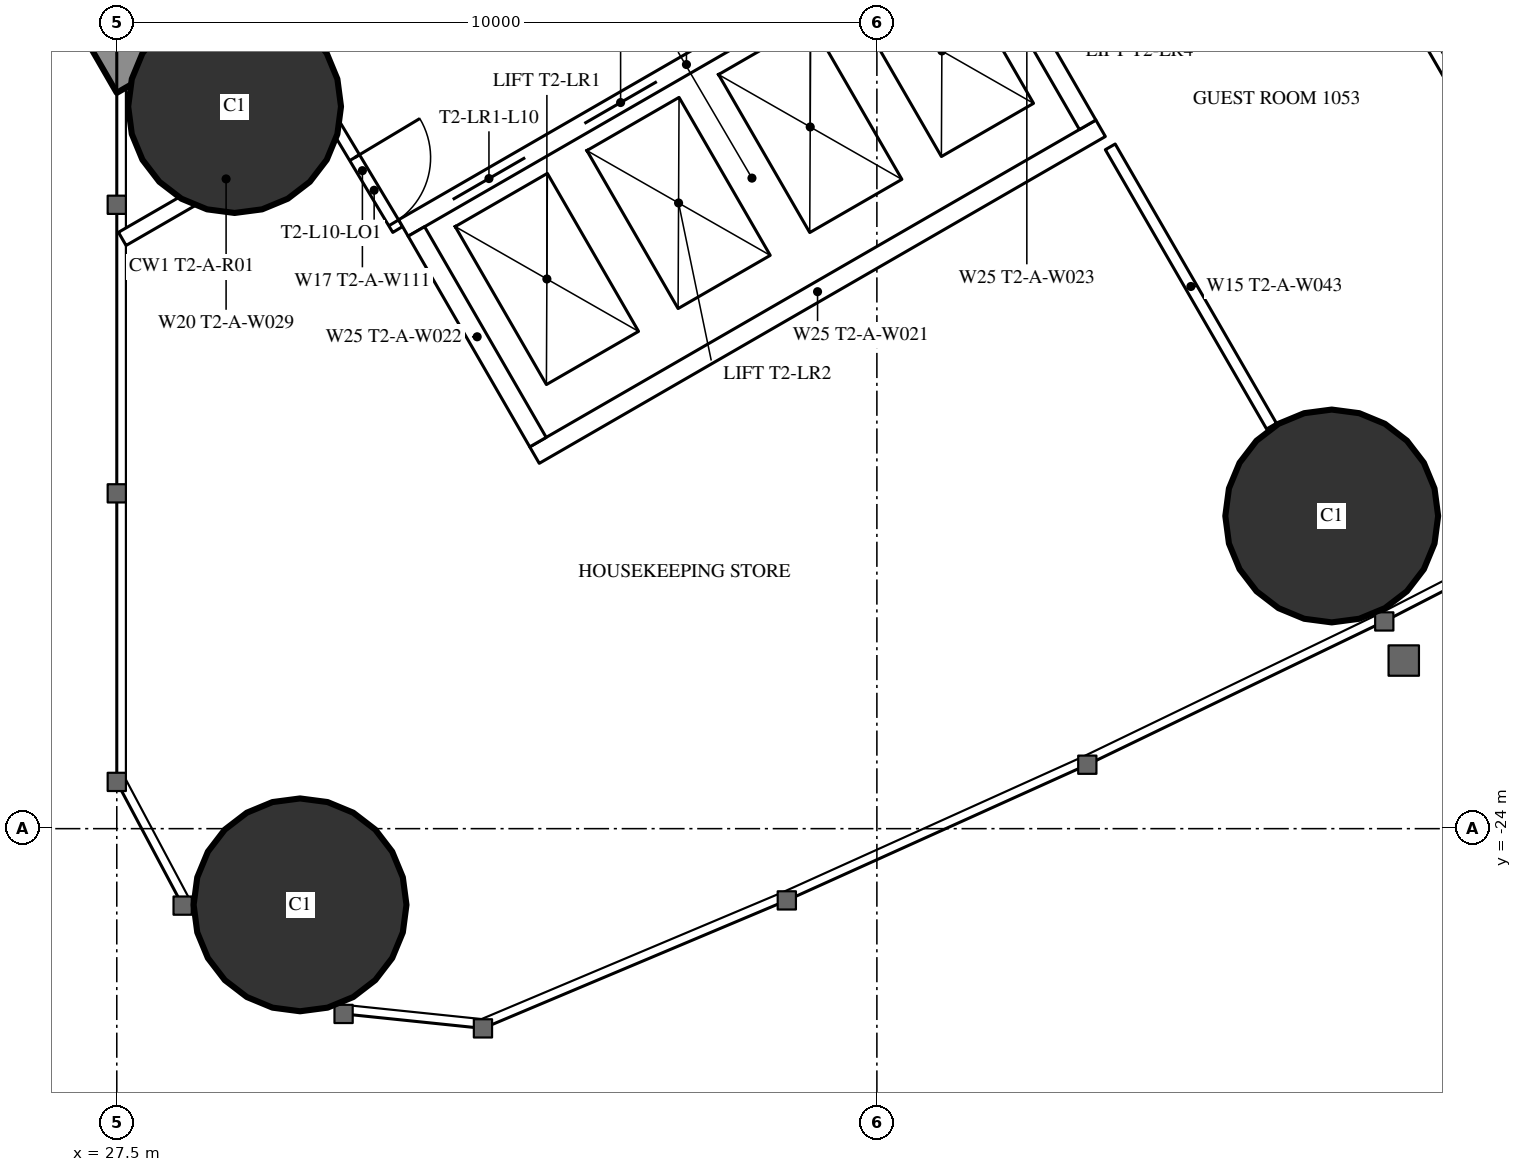
"""IFC4 building model, lengths in metres.
Left out: names, types, materials, properties, quantities, classifications, styles, units other than length and angle.
Written with IfcOpenShell. Run it as: python <this file> out.ifc"""

import sys

from ifc_helpers import new_model, si_unit, direction, frame, frame_2d, origin, origin_2d, place, context, subcontext, project, spatial, rectangle, hollow_circle, extrude, element, fill, save


model = new_model("IFC4")
c1 = context("Model", 3, precision=1e-05, world=origin(), true_north=direction((0.0, 1.0)))
c2 = subcontext(c1, "Body", "Model", "MODEL_VIEW")
j1 = project(units=[si_unit("LENGTHUNIT", "METRE"), si_unit("PLANEANGLEUNIT", "RADIAN")], contexts=[c1])
p1 = place(None, origin())
s1 = spatial("IfcSite", under=j1, at=p1, CompositionType="ELEMENT")
p2 = place(p1, origin())
s2 = spatial("IfcBuilding", under=s1, at=p2, CompositionType="ELEMENT")
p3 = place(p2, frame((0.0, 0.0, 42.5)))
s3 = spatial("IfcBuildingStorey", under=s2, at=p3, CompositionType="ELEMENT", Elevation=42.5)
for number, where, z_axis, x_axis in (
    (1, (29.911, -25.002, 0.0), (0.0, 0.0, 1.0), (1.0, 0.0, 0.0)),
    (2, (29.05, -14.5, 0.0), (0.0, 0.0, 1.0), (1.0, 0.0, 0.0)),
    (3, (43.484, -19.886, 0.0), (0.0, 0.0, 1.0), (1.0, 0.0, 0.0)),
):
    element("IfcColumn", number, at=place(p3, frame(where, z_axis=z_axis, x_axis=x_axis)), inside=s3, PredefinedType="COLUMN", context=c2, shape_type="SweptSolid", body=[
        extrude(hollow_circle(Radius=1.4, WallThickness=0.12, at=origin_2d()), origin(), (0.0, 0.0, 1.0), 3.5),
    ])
p4 = place(p3, frame((27.2, -13.8, 0.0), z_axis=(0.0, 0.0, 1.0), x_axis=(0.866027159892, 0.499996958321, 0.0)))
e4 = element("IfcWall", 4, at=p4, inside=s3, PredefinedType="SHEAR", context=c2, shape_type="SweptSolid", body=[
    extrude(rectangle(XDim=27.947, YDim=1.2, at=frame_2d((13.973, 0.0))), origin(), (0.0, 0.0, 1.0), 3.5),
])
p5 = place(p4, frame((4.6, 0.0, 0.0)))
e5 = element("IfcOpeningElement", 5, at=p5, cuts=e4, PredefinedType="OPENING", context=c2, shape_type="SweptSolid", body=[
    extrude(rectangle(XDim=1.0, YDim=2.2, at=frame_2d((0.5, 1.1))), frame((0.0, 0.61, 0.0), z_axis=(0.0, -1.0, 0.0), x_axis=(1.0, 0.0, 0.0)), (0.0, 0.0, 1.0), 1.22),
])
p6 = place(p4, frame((13.395, 0.0, 0.0)))
e6 = element("IfcOpeningElement", 6, at=p6, cuts=e4, PredefinedType="OPENING", context=c2, shape_type="SweptSolid", body=[
    extrude(rectangle(XDim=1.8, YDim=2.2, at=frame_2d((0.9, 1.1))), frame((0.0, 0.61, 0.0), z_axis=(0.0, -1.0, 0.0), x_axis=(1.0, 0.0, 0.0)), (0.0, 0.0, 1.0), 1.22),
])
p7 = place(p3, frame((41.647, -8.23, 0.0), z_axis=(0.0, 0.0, 1.0), x_axis=(0.49998590462, -0.866033541603, 0.0)))
e7 = element("IfcWall", 7, at=p7, inside=s3, PredefinedType="PARTITIONING", context=c2, shape_type="SweptSolid", body=[
    extrude(rectangle(XDim=12.621, YDim=0.15, at=frame_2d((6.311, 0.0))), origin(), (0.0, 0.0, 1.0), 3.25),
])
p8 = place(p3, frame((40.57, -15.03, 0.0), z_axis=(0.0, 0.0, 1.0), x_axis=(0.500012993597, -0.866017901798, 0.0)))
e8 = element("IfcWall", 8, at=p8, inside=s3, PredefinedType="PARTITIONING", context=c2, shape_type="SweptSolid", body=[
    extrude(rectangle(XDim=4.243, YDim=0.15, at=frame_2d((2.122, 0.0))), origin(), (0.0, 0.0, 1.0), 3.25),
])
p9 = place(p3, frame((27.572, -16.241, 0.0), z_axis=(0.0, 0.0, 1.0), x_axis=(0.866029654818, 0.499992636921, 0.0)))
e9 = element("IfcWall", 9, at=p9, inside=s3, PredefinedType="PARTITIONING", context=c2, shape_type="SweptSolid", body=[
    extrude(rectangle(XDim=3.155, YDim=0.2, at=frame_2d((1.577, 0.0))), origin(), (0.0, 0.0, 1.0), 3.25),
])
p10 = place(p3, frame((30.267, -14.569, 0.0), z_axis=(0.0, 0.0, 1.0), x_axis=(0.514336634837, -0.857588377991, 0.0)))
e10 = element("IfcWall", 10, at=p10, inside=s3, PredefinedType="PARTITIONING", context=c2, shape_type="SweptSolid", body=[
    extrude(rectangle(XDim=1.805, YDim=0.15, at=frame_2d((0.903, 0.0))), origin(), (0.0, 0.0, 1.0), 3.25),
])
p11 = place(p10, frame((0.703, 0.0, 0.0)))
e11 = element("IfcOpeningElement", 11, at=p11, cuts=e10, PredefinedType="OPENING", context=c2, shape_type="SweptSolid", body=[
    extrude(rectangle(XDim=1.0, YDim=2.2, at=frame_2d((0.5, 1.1))), frame((0.0, 0.085, 0.0), z_axis=(0.0, -1.0, 0.0), x_axis=(1.0, 0.0, 0.0)), (0.0, 0.0, 1.0), 0.17),
])
p12 = place(p3, frame((31.271, -16.097, 0.0), z_axis=(0.0, 0.0, 1.0), x_axis=(0.86604045752, 0.499973925258, 0.0)))
e12 = element("IfcWall", 12, at=p12, inside=s3, PredefinedType="PARTITIONING", context=c2, shape_type="SweptSolid", body=[
    extrude(rectangle(XDim=8.6, YDim=0.25, at=frame_2d((4.3, 0.0))), origin(), (0.0, 0.0, 1.0), 3.25),
])
p13 = place(p12, frame((0.75, 0.0, 0.0)))
e13 = element("IfcOpeningElement", 13, at=p13, cuts=e12, PredefinedType="OPENING", context=c2, shape_type="SweptSolid", body=[
    extrude(rectangle(XDim=1.1, YDim=2.2, at=frame_2d((0.55, 1.1))), frame((0.0, 0.135, 0.0), z_axis=(0.0, -1.0, 0.0), x_axis=(1.0, 0.0, 0.0)), (0.0, 0.0, 1.0), 0.27),
])
p14 = place(p12, frame((2.75, 0.0, 0.0)))
e14 = element("IfcOpeningElement", 14, at=p14, cuts=e12, PredefinedType="OPENING", context=c2, shape_type="SweptSolid", body=[
    extrude(rectangle(XDim=1.1, YDim=2.2, at=frame_2d((0.55, 1.1))), frame((0.0, 0.135, 0.0), z_axis=(0.0, -1.0, 0.0), x_axis=(1.0, 0.0, 0.0)), (0.0, 0.0, 1.0), 0.27),
])
p15 = place(p12, frame((4.75, 0.0, 0.0)))
e15 = element("IfcOpeningElement", 15, at=p15, cuts=e12, PredefinedType="OPENING", context=c2, shape_type="SweptSolid", body=[
    extrude(rectangle(XDim=1.1, YDim=2.2, at=frame_2d((0.55, 1.1))), frame((0.0, 0.135, 0.0), z_axis=(0.0, -1.0, 0.0), x_axis=(1.0, 0.0, 0.0)), (0.0, 0.0, 1.0), 0.27),
])
p16 = place(p12, frame((6.75, 0.0, 0.0)))
e16 = element("IfcOpeningElement", 16, at=p16, cuts=e12, PredefinedType="OPENING", context=c2, shape_type="SweptSolid", body=[
    extrude(rectangle(XDim=1.1, YDim=2.2, at=frame_2d((0.55, 1.1))), frame((0.0, 0.135, 0.0), z_axis=(0.0, -1.0, 0.0), x_axis=(1.0, 0.0, 0.0)), (0.0, 0.0, 1.0), 0.27),
])
p17 = place(p3, frame((32.996, -19.086, 0.0), z_axis=(0.0, 0.0, 1.0), x_axis=(0.866028165386, 0.499995216735, 0.0)))
e17 = element("IfcWall", 17, at=p17, inside=s3, PredefinedType="PARTITIONING", context=c2, shape_type="SweptSolid", body=[
    extrude(rectangle(XDim=8.6, YDim=0.25, at=frame_2d((4.3, 0.0))), origin(), (0.0, 0.0, 1.0), 3.25),
])
for number, where, z_axis, x_axis in (
    (18, (31.441, -16.143, 0.0), (0.0, 0.0, 1.0), (0.5, -0.866, 0.0)),
    (19, (38.673, -11.968, 0.0), (0.0, 0.0, 1.0), (0.5, -0.866, 0.0)),
):
    element("IfcWall", number, at=place(p3, frame(where, z_axis=z_axis, x_axis=x_axis)), inside=s3, PredefinedType="PARTITIONING", context=c2, shape_type="SweptSolid", body=[
        extrude(rectangle(XDim=3.201, YDim=0.25, at=frame_2d((1.6, 0.0))), origin(), (0.0, 0.0, 1.0), 3.25),
    ])
p18 = place(p11, origin())
e20 = element("IfcDoor", 20, at=p18, inside=s3, OperationType="SINGLE_SWING_LEFT", PredefinedType="DOOR", context=c2, shape_type="SweptSolid", body=[
    extrude(rectangle(XDim=1.0, YDim=2.2, at=frame_2d((0.5, 1.1))), frame((0.0, 0.025, 0.0), z_axis=(0.0, -1.0, 0.0), x_axis=(1.0, 0.0, 0.0)), (0.0, 0.0, 1.0), 0.05),
])
fill(e11, e20)
p19 = place(p13, origin())
e21 = element("IfcDoor", 21, at=p19, inside=s3, OperationType="DOUBLE_DOOR_SLIDING", PredefinedType="USERDEFINED", context=c2, shape_type="SweptSolid", body=[
    extrude(rectangle(XDim=1.1, YDim=2.2, at=frame_2d((0.55, 1.1))), frame((0.0, 0.025, 0.0), z_axis=(0.0, -1.0, 0.0), x_axis=(1.0, 0.0, 0.0)), (0.0, 0.0, 1.0), 0.05),
])
fill(e13, e21)
p20 = place(p14, origin())
e22 = element("IfcDoor", 22, at=p20, inside=s3, OperationType="DOUBLE_DOOR_SLIDING", PredefinedType="USERDEFINED", context=c2, shape_type="SweptSolid", body=[
    extrude(rectangle(XDim=1.1, YDim=2.2, at=frame_2d((0.55, 1.1))), frame((0.0, 0.025, 0.0), z_axis=(0.0, -1.0, 0.0), x_axis=(1.0, 0.0, 0.0)), (0.0, 0.0, 1.0), 0.05),
])
fill(e14, e22)
save(model, sys.argv[1])
